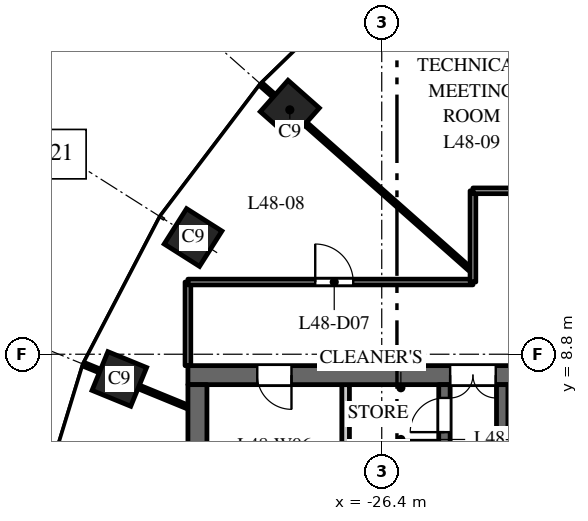
"""IFC4 building model, lengths in metres.
Left out: names, types, materials, properties, quantities, classifications, styles, units other than length and angle.
Written with IfcOpenShell. Run it as: python <this file> out.ifc"""

import sys

from ifc_helpers import new_model, si_unit, direction, frame, frame_2d, origin, origin_2d, place, context, subcontext, project, spatial, rectangle, extrude, element, fill, save


model = new_model("IFC4")
c1 = context("Model", 3, precision=1e-05, world=origin(), true_north=direction((0.0, 1.0)))
c2 = subcontext(c1, "Body", "Model", "MODEL_VIEW")
j1 = project(units=[si_unit("LENGTHUNIT", "METRE"), si_unit("PLANEANGLEUNIT", "RADIAN")], contexts=[c1])
p1 = place(None, origin())
s1 = spatial("IfcSite", under=j1, at=p1, CompositionType="ELEMENT")
p2 = place(p1, origin())
s2 = spatial("IfcBuilding", under=s1, at=p2, CompositionType="ELEMENT")
p3 = place(p2, frame((0.0, 0.0, 233.5)))
s3 = spatial("IfcBuildingStorey", under=s2, at=p3, CompositionType="ELEMENT", Elevation=233.5)
for number, where, z_axis, x_axis in (
    (1, (-28.819, 15.23, 0.0), (0.0, 0.0, 1.0), (-0.663, -0.749, 0.0)),
    (2, (-31.365, 11.871, 0.0), (0.0, 0.0, 1.0), (-0.535, -0.845, 0.0)),
    (3, (-33.305, 8.149, 0.0), (0.0, 0.0, 1.0), (-0.379, -0.925, 0.0)),
):
    element("IfcColumn", number, at=place(p3, frame(where, z_axis=z_axis, x_axis=x_axis)), inside=s3, PredefinedType="COLUMN", context=c2, shape_type="SweptSolid", body=[
        extrude(rectangle(XDim=1.1, YDim=1.1, at=origin_2d()), origin(), (0.0, 0.0, 1.0), 4.0),
    ])
p4 = place(p3, frame((-16.5, 8.25, 0.0), z_axis=(0.0, 0.0, 1.0), x_axis=(-1.0, 0.0, 0.0)))
e4 = element("IfcWall", 4, at=p4, inside=s3, PredefinedType="SHEAR", context=c2, shape_type="SweptSolid", body=[
    extrude(rectangle(XDim=15.0, YDim=0.5, at=frame_2d((7.5, 0.0))), origin(), (0.0, 0.0, 1.0), 3.7),
])
p5 = place(p4, frame((6.9, 0.0, 0.0)))
e5 = element("IfcOpeningElement", 5, at=p5, cuts=e4, PredefinedType="OPENING", context=c2, shape_type="SweptSolid", body=[
    extrude(rectangle(XDim=1.2, YDim=2.1, at=frame_2d((0.6, 1.05))), frame((0.0, 0.26, 0.0), z_axis=(0.0, -1.0, 0.0), x_axis=(1.0, 0.0, 0.0)), (0.0, 0.0, 1.0), 0.52),
])
p6 = place(p4, frame((12.275, 0.0, 0.0)))
e6 = element("IfcOpeningElement", 6, at=p6, cuts=e4, PredefinedType="OPENING", context=c2, shape_type="SweptSolid", body=[
    extrude(rectangle(XDim=0.9, YDim=2.1, at=frame_2d((0.45, 1.05))), frame((0.0, 0.26, 0.0), z_axis=(0.0, -1.0, 0.0), x_axis=(1.0, 0.0, 0.0)), (0.0, 0.0, 1.0), 0.52),
])
p7 = place(p3, frame((-24.75, -8.0, 0.0), z_axis=(0.0, 0.0, 1.0), x_axis=(0.0, 1.0, 0.0)))
e7 = element("IfcWall", 7, at=p7, inside=s3, PredefinedType="SHEAR", context=c2, shape_type="SweptSolid", body=[
    extrude(rectangle(XDim=16.0, YDim=0.3, at=frame_2d((8.0, 0.0))), origin(), (0.0, 0.0, 1.0), 3.7),
])
p8 = place(p7, frame((4.425, 0.0, 0.0)))
e8 = element("IfcOpeningElement", 8, at=p8, cuts=e7, PredefinedType="OPENING", context=c2, shape_type="SweptSolid", body=[
    extrude(rectangle(XDim=1.1, YDim=2.1, at=frame_2d((0.55, 1.05))), frame((0.0, 0.16, 0.0), z_axis=(0.0, -1.0, 0.0), x_axis=(1.0, 0.0, 0.0)), (0.0, 0.0, 1.0), 0.32),
])
p9 = place(p7, frame((7.45, 0.0, 0.0)))
e9 = element("IfcOpeningElement", 9, at=p9, cuts=e7, PredefinedType="OPENING", context=c2, shape_type="SweptSolid", body=[
    extrude(rectangle(XDim=1.1, YDim=2.1, at=frame_2d((0.55, 1.05))), frame((0.0, 0.16, 0.0), z_axis=(0.0, -1.0, 0.0), x_axis=(1.0, 0.0, 0.0)), (0.0, 0.0, 1.0), 0.32),
])
p10 = place(p7, frame((10.475, 0.0, 0.0)))
e10 = element("IfcOpeningElement", 10, at=p10, cuts=e7, PredefinedType="OPENING", context=c2, shape_type="SweptSolid", body=[
    extrude(rectangle(XDim=1.1, YDim=2.1, at=frame_2d((0.55, 1.05))), frame((0.0, 0.16, 0.0), z_axis=(0.0, -1.0, 0.0), x_axis=(1.0, 0.0, 0.0)), (0.0, 0.0, 1.0), 0.32),
])
p11 = place(p7, frame((13.125, 0.0, 0.0)))
e11 = element("IfcOpeningElement", 11, at=p11, cuts=e7, PredefinedType="OPENING", context=c2, shape_type="SweptSolid", body=[
    extrude(rectangle(XDim=0.9, YDim=2.1, at=frame_2d((0.45, 1.05))), frame((0.0, 0.16, 0.0), z_axis=(0.0, -1.0, 0.0), x_axis=(1.0, 0.0, 0.0)), (0.0, 0.0, 1.0), 0.32),
])
p12 = place(p7, frame((14.75, 0.0, 0.0)))
e12 = element("IfcOpeningElement", 12, at=p12, cuts=e7, PredefinedType="OPENING", context=c2, shape_type="SweptSolid", body=[
    extrude(rectangle(XDim=0.9, YDim=2.1, at=frame_2d((0.45, 1.05))), frame((0.0, 0.16, 0.0), z_axis=(0.0, -1.0, 0.0), x_axis=(1.0, 0.0, 0.0)), (0.0, 0.0, 1.0), 0.32),
])
p13 = place(p7, frame((1.35, 0.0, 0.0)))
e13 = element("IfcOpeningElement", 13, at=p13, cuts=e7, PredefinedType="OPENING", context=c2, shape_type="SweptSolid", body=[
    extrude(rectangle(XDim=0.9, YDim=2.1, at=frame_2d((0.45, 1.05))), frame((0.0, 0.16, 0.0), z_axis=(0.0, -1.0, 0.0), x_axis=(1.0, 0.0, 0.0)), (0.0, 0.0, 1.0), 0.32),
])
p14 = place(p3, frame((-31.25, -8.0, 0.0), z_axis=(0.0, 0.0, 1.0), x_axis=(0.0, 1.0, 0.0)))
e14 = element("IfcWall", 14, at=p14, inside=s3, PredefinedType="SHEAR", context=c2, shape_type="SweptSolid", body=[
    extrude(rectangle(XDim=16.0, YDim=0.5, at=frame_2d((8.0, 0.0))), origin(), (0.0, 0.0, 1.0), 3.7),
])
p15 = place(p3, frame((-27.35, 4.75, 0.0), z_axis=(0.0, 0.0, 1.0), x_axis=(0.0, 1.0, 0.0)))
e15 = element("IfcWall", 15, at=p15, inside=s3, PredefinedType="PARTITIONING", context=c2, shape_type="SweptSolid", body=[
    extrude(rectangle(XDim=3.25, YDim=0.2, at=frame_2d((1.625, 0.0))), origin(), (0.0, 0.0, 1.0), 3.7),
])
p16 = place(p3, frame((-23.23, 2.25, 0.0), z_axis=(0.0, 0.0, 1.0), x_axis=(0.0, 1.0, 0.0)))
e16 = element("IfcWall", 16, at=p16, inside=s3, PredefinedType="SHEAR", context=c2, shape_type="SweptSolid", body=[
    extrude(rectangle(XDim=5.75, YDim=0.3, at=frame_2d((2.875, 0.0))), origin(), (0.0, 0.0, 1.0), 3.7),
])
p17 = place(p16, frame((0.6, 0.0, 0.0)))
e17 = element("IfcOpeningElement", 17, at=p17, cuts=e16, PredefinedType="OPENING", context=c2, shape_type="SweptSolid", body=[
    extrude(rectangle(XDim=1.0, YDim=2.1, at=frame_2d((0.5, 1.05))), frame((0.0, 0.16, 0.0), z_axis=(0.0, -1.0, 0.0), x_axis=(1.0, 0.0, 0.0)), (0.0, 0.0, 1.0), 0.32),
])
p18 = place(p3, frame((-34.234, 8.53, 0.0), z_axis=(0.0, 0.0, 1.0), x_axis=(0.925344112436, -0.379128307542, 0.0)))
e18 = element("IfcWall", 18, at=p18, inside=s3, PredefinedType="PARTITIONING", context=c2, shape_type="SweptSolid", body=[
    extrude(rectangle(XDim=2.954, YDim=0.1, at=frame_2d((1.477, 0.0))), origin(), (0.0, 0.0, 1.0), 3.0),
])
p19 = place(p3, frame((-31.5, 8.5, 0.0), z_axis=(0.0, 0.0, 1.0), x_axis=(0.0, 1.0, 0.0)))
e19 = element("IfcWall", 19, at=p19, inside=s3, PredefinedType="PARTITIONING", context=c2, shape_type="SweptSolid", body=[
    extrude(rectangle(XDim=2.2, YDim=0.15, at=frame_2d((1.1, 0.0))), origin(), (0.0, 0.0, 1.0), 3.7),
])
p20 = place(p3, frame((-31.5, 10.7, 0.0), z_axis=(0.0, 0.0, 1.0), x_axis=(1.0, 0.0, 0.0)))
e20 = element("IfcWall", 20, at=p20, inside=s3, PredefinedType="PARTITIONING", context=c2, shape_type="SweptSolid", body=[
    extrude(rectangle(XDim=7.5, YDim=0.15, at=frame_2d((3.75, 0.0))), origin(), (0.0, 0.0, 1.0), 3.1),
])
p21 = place(p20, frame((3.35, 0.0, 0.0)))
e21 = element("IfcOpeningElement", 21, at=p21, cuts=e20, PredefinedType="OPENING", context=c2, shape_type="SweptSolid", body=[
    extrude(rectangle(XDim=1.0, YDim=2.1, at=frame_2d((0.5, 1.05))), frame((0.0, 0.085, 0.0), z_axis=(0.0, -1.0, 0.0), x_axis=(1.0, 0.0, 0.0)), (0.0, 0.0, 1.0), 0.17),
])
p22 = place(p3, frame((-29.569, 15.895, 0.0), z_axis=(0.0, 0.0, 1.0), x_axis=(0.748936848479, -0.662641378869, 0.0)))
e22 = element("IfcWall", 22, at=p22, inside=s3, PredefinedType="PARTITIONING", context=c2, shape_type="SweptSolid", body=[
    extrude(rectangle(XDim=7.336, YDim=0.1, at=frame_2d((3.668, 0.0))), origin(), (0.0, 0.0, 1.0), 3.0),
])
p23 = place(p3, frame((-24.0, 10.7, 0.0), z_axis=(0.0, 0.0, 1.0), x_axis=(0.0, 1.0, 0.0)))
e23 = element("IfcWall", 23, at=p23, inside=s3, PredefinedType="PARTITIONING", context=c2, shape_type="SweptSolid", body=[
    extrude(rectangle(XDim=2.4, YDim=0.15, at=frame_2d((1.2, 0.0))), origin(), (0.0, 0.0, 1.0), 3.7),
])
p24 = place(p3, frame((-24.0, 13.1, 0.0), z_axis=(0.0, 0.0, 1.0), x_axis=(1.0, 0.0, 0.0)))
e24 = element("IfcWall", 24, at=p24, inside=s3, PredefinedType="PARTITIONING", context=c2, shape_type="SweptSolid", body=[
    extrude(rectangle(XDim=13.357, YDim=0.15, at=frame_2d((6.678, 0.0))), origin(), (0.0, 0.0, 1.0), 2.75),
])
p25 = place(p24, frame((2.893, 0.0, 0.0)))
e25 = element("IfcOpeningElement", 25, at=p25, cuts=e24, PredefinedType="OPENING", context=c2, shape_type="SweptSolid", body=[
    extrude(rectangle(XDim=1.0, YDim=2.1, at=frame_2d((0.5, 1.05))), frame((0.0, 0.085, 0.0), z_axis=(0.0, -1.0, 0.0), x_axis=(1.0, 0.0, 0.0)), (0.0, 0.0, 1.0), 0.17),
])
p26 = place(p24, frame((9.457, 0.0, 0.0)))
e26 = element("IfcOpeningElement", 26, at=p26, cuts=e24, PredefinedType="OPENING", context=c2, shape_type="SweptSolid", body=[
    extrude(rectangle(XDim=1.0, YDim=2.1, at=frame_2d((0.5, 1.05))), frame((0.0, 0.085, 0.0), z_axis=(0.0, -1.0, 0.0), x_axis=(1.0, 0.0, 0.0)), (0.0, 0.0, 1.0), 0.17),
])
p27 = place(p5, origin())
e27 = element("IfcDoor", 27, at=p27, inside=s3, OperationType="DOUBLE_DOOR_DOUBLE_SWING", PredefinedType="DOOR", context=c2, shape_type="SweptSolid", body=[
    extrude(rectangle(XDim=1.2, YDim=2.1, at=frame_2d((0.6, 1.05))), frame((0.0, 0.025, 0.0), z_axis=(0.0, -1.0, 0.0), x_axis=(1.0, 0.0, 0.0)), (0.0, 0.0, 1.0), 0.05),
])
fill(e5, e27)
p28 = place(p12, origin())
e28 = element("IfcDoor", 28, at=p28, inside=s3, OperationType="SINGLE_SWING_RIGHT", PredefinedType="DOOR", context=c2, shape_type="SweptSolid", body=[
    extrude(rectangle(XDim=0.9, YDim=2.1, at=frame_2d((0.45, 1.05))), frame((0.0, 0.025, 0.0), z_axis=(0.0, -1.0, 0.0), x_axis=(1.0, 0.0, 0.0)), (0.0, 0.0, 1.0), 0.05),
])
fill(e12, e28)
p29 = place(p6, origin())
e29 = element("IfcDoor", 29, at=p29, inside=s3, OperationType="SINGLE_SWING_RIGHT", PredefinedType="DOOR", context=c2, shape_type="SweptSolid", body=[
    extrude(rectangle(XDim=0.9, YDim=2.1, at=frame_2d((0.45, 1.05))), frame((0.0, 0.025, 0.0), z_axis=(0.0, -1.0, 0.0), x_axis=(1.0, 0.0, 0.0)), (0.0, 0.0, 1.0), 0.05),
])
fill(e6, e29)
p30 = place(p21, origin())
e30 = element("IfcDoor", 30, at=p30, inside=s3, OperationType="SINGLE_SWING_LEFT", PredefinedType="DOOR", context=c2, shape_type="SweptSolid", body=[
    extrude(rectangle(XDim=1.0, YDim=2.1, at=frame_2d((0.5, 1.05))), frame((0.0, 0.025, 0.0), z_axis=(0.0, -1.0, 0.0), x_axis=(1.0, 0.0, 0.0)), (0.0, 0.0, 1.0), 0.05),
])
fill(e21, e30)
save(model, sys.argv[1])
